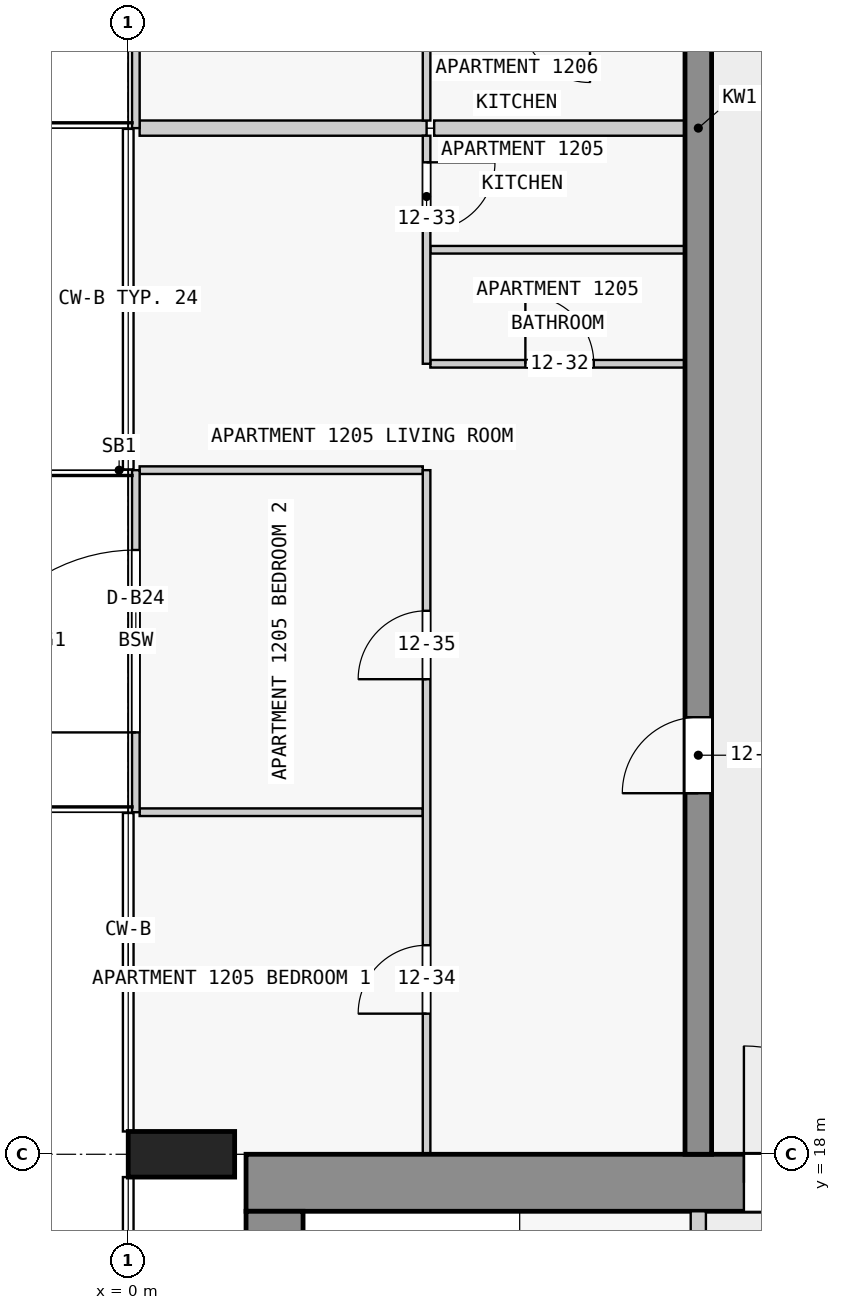
"""IFC4 building model, lengths in metres.
Left out: names, types, materials, properties, quantities, classifications, styles, units other than length and angle.
Written with IfcOpenShell. Run it as: python <this file> out.ifc"""

import sys

from ifc_helpers import new_model, si_unit, direction, frame, frame_2d, origin, origin_2d, place, context, subcontext, project, spatial, rectangle, extrude, element, fill, save


model = new_model("IFC4")
c1 = context("Model", 3, precision=1e-05, world=origin(), true_north=direction((0.0, 1.0)))
c2 = subcontext(c1, "Body", "Model", "MODEL_VIEW")
j1 = project(units=[si_unit("LENGTHUNIT", "METRE"), si_unit("PLANEANGLEUNIT", "RADIAN")], contexts=[c1])
p1 = place(None, origin())
s1 = spatial("IfcSite", under=j1, at=p1, CompositionType="ELEMENT")
p2 = place(p1, origin())
s2 = spatial("IfcBuilding", under=s1, at=p2, CompositionType="ELEMENT")
p3 = place(p2, frame((0.0, 0.0, 51.3)))
s3 = spatial("IfcBuildingStorey", under=s2, at=p3, CompositionType="ELEMENT", Elevation=51.3)
p4 = place(p3, frame((0.7, 18.0, 0.0), z_axis=(0.0, 0.0, 1.0), x_axis=(0.0, 1.0, 0.0)))
e1 = element("IfcColumn", 1, at=p4, inside=s3, PredefinedType="COLUMN", context=c2, shape_type="SweptSolid", body=[
    extrude(rectangle(XDim=0.6, YDim=1.4, at=origin_2d()), origin(), (0.0, 0.0, 1.0), 3.5),
])
p5 = place(p3, frame((1.55, 17.625, 0.0), z_axis=(0.0, 0.0, 1.0), x_axis=(1.0, 0.0, 0.0)))
e2 = element("IfcWall", 2, at=p5, inside=s3, PredefinedType="SHEAR", context=c2, shape_type="SweptSolid", body=[
    extrude(rectangle(XDim=20.95, YDim=0.75, at=frame_2d((10.475, 0.0))), origin(), (0.0, 0.0, 1.0), 3.25),
])
p6 = place(p5, frame((6.55, 0.0, 0.0)))
e3 = element("IfcOpeningElement", 3, at=p6, cuts=e2, PredefinedType="OPENING", context=c2, shape_type="SweptSolid", body=[
    extrude(rectangle(XDim=1.8, YDim=2.1, at=frame_2d((0.9, 1.05))), frame((0.0, 0.385, 0.0), z_axis=(0.0, -1.0, 0.0), x_axis=(1.0, 0.0, 0.0)), (0.0, 0.0, 1.0), 0.77),
])
p7 = place(p3, frame((1.925, 2.5, 0.0), z_axis=(0.0, 0.0, 1.0), x_axis=(0.0, 1.0, 0.0)))
e4 = element("IfcWall", 4, at=p7, inside=s3, PredefinedType="SHEAR", context=c2, shape_type="SweptSolid", body=[
    extrude(rectangle(XDim=14.75, YDim=0.75, at=frame_2d((7.375, 0.0))), origin(), (0.0, 0.0, 1.0), 3.25),
])
p8 = place(p3, frame((7.5, 18.0, 0.0), z_axis=(0.0, 0.0, 1.0), x_axis=(0.0, 1.0, 0.0)))
e5 = element("IfcWall", 5, at=p8, inside=s3, PredefinedType="SHEAR", context=c2, shape_type="SweptSolid", body=[
    extrude(rectangle(XDim=27.0, YDim=0.35, at=frame_2d((13.5, 0.0))), origin(), (0.0, 0.0, 1.0), 3.25),
])
p9 = place(p8, frame((4.75, 0.0, 0.0)))
e6 = element("IfcOpeningElement", 6, at=p9, cuts=e5, PredefinedType="OPENING", context=c2, shape_type="SweptSolid", body=[
    extrude(rectangle(XDim=1.0, YDim=2.1, at=frame_2d((0.5, 1.05))), frame((0.0, 0.185, 0.0), z_axis=(0.0, -1.0, 0.0), x_axis=(1.0, 0.0, 0.0)), (0.0, 0.0, 1.0), 0.37),
])
p10 = place(p8, frame((15.25, 0.0, 0.0)))
e7 = element("IfcOpeningElement", 7, at=p10, cuts=e5, PredefinedType="OPENING", context=c2, shape_type="SweptSolid", body=[
    extrude(rectangle(XDim=1.0, YDim=2.1, at=frame_2d((0.5, 1.05))), frame((0.0, 0.185, 0.0), z_axis=(0.0, -1.0, 0.0), x_axis=(1.0, 0.0, 0.0)), (0.0, 0.0, 1.0), 0.37),
])
p11 = place(p8, frame((19.75, 0.0, 0.0)))
e8 = element("IfcOpeningElement", 8, at=p11, cuts=e5, PredefinedType="OPENING", context=c2, shape_type="SweptSolid", body=[
    extrude(rectangle(XDim=1.0, YDim=2.1, at=frame_2d((0.5, 1.05))), frame((0.0, 0.185, 0.0), z_axis=(0.0, -1.0, 0.0), x_axis=(1.0, 0.0, 0.0)), (0.0, 0.0, 1.0), 0.37),
])
p12 = place(p8, frame((23.25, 0.0, 0.0)))
e9 = element("IfcOpeningElement", 9, at=p12, cuts=e5, PredefinedType="OPENING", context=c2, shape_type="SweptSolid", body=[
    extrude(rectangle(XDim=0.9, YDim=2.1, at=frame_2d((0.45, 1.05))), frame((0.0, 0.185, 0.0), z_axis=(0.0, -1.0, 0.0), x_axis=(1.0, 0.0, 0.0)), (0.0, 0.0, 1.0), 0.37),
])
p13 = place(p8, frame((25.45, 0.0, 0.0)))
e10 = element("IfcOpeningElement", 10, at=p13, cuts=e5, PredefinedType="OPENING", context=c2, shape_type="SweptSolid", body=[
    extrude(rectangle(XDim=1.0, YDim=2.1, at=frame_2d((0.5, 1.05))), frame((0.0, 0.185, 0.0), z_axis=(0.0, -1.0, 0.0), x_axis=(1.0, 0.0, 0.0)), (0.0, 0.0, 1.0), 0.37),
])
p14 = place(p3, frame((0.1, 22.5, 0.0), z_axis=(0.0, 0.0, 1.0), x_axis=(0.0, 1.0, 0.0)))
e11 = element("IfcWall", 11, at=p14, inside=s3, PredefinedType="STANDARD", context=c2, shape_type="SweptSolid", body=[
    extrude(rectangle(XDim=4.5, YDim=0.1, at=frame_2d((2.25, 0.0))), origin(), (0.0, 0.0, 1.0), 3.25),
])
p15 = place(p14, frame((1.05, 0.0, 0.0)))
e12 = element("IfcOpeningElement", 12, at=p15, cuts=e11, PredefinedType="OPENING", context=c2, shape_type="SweptSolid", body=[
    extrude(rectangle(XDim=2.4, YDim=2.4, at=frame_2d((1.2, 1.2))), frame((0.0, 0.06, 0.0), z_axis=(0.0, -1.0, 0.0), x_axis=(1.0, 0.0, 0.0)), (0.0, 0.0, 1.0), 0.12),
])
p16 = place(p3, frame((0.1, 31.5, 0.0), z_axis=(0.0, 0.0, 1.0), x_axis=(0.0, 1.0, 0.0)))
e13 = element("IfcWall", 13, at=p16, inside=s3, PredefinedType="STANDARD", context=c2, shape_type="SweptSolid", body=[
    extrude(rectangle(XDim=4.5, YDim=0.1, at=frame_2d((2.25, 0.0))), origin(), (0.0, 0.0, 1.0), 3.25),
])
p17 = place(p16, frame((1.05, 0.0, 0.0)))
e14 = element("IfcOpeningElement", 14, at=p17, cuts=e13, PredefinedType="OPENING", context=c2, shape_type="SweptSolid", body=[
    extrude(rectangle(XDim=2.4, YDim=2.4, at=frame_2d((1.2, 1.2))), frame((0.0, 0.06, 0.0), z_axis=(0.0, -1.0, 0.0), x_axis=(1.0, 0.0, 0.0)), (0.0, 0.0, 1.0), 0.12),
])
p18 = place(p3, frame((7.5, 10.1, 0.0), z_axis=(0.0, 0.0, 1.0), x_axis=(0.0, 1.0, 0.0)))
e15 = element("IfcWall", 15, at=p18, inside=s3, PredefinedType="PARTITIONING", context=c2, shape_type="SweptSolid", body=[
    extrude(rectangle(XDim=7.15, YDim=0.2, at=frame_2d((3.575, 0.0))), origin(), (0.0, 0.0, 1.0), 3.25),
])
p19 = place(p18, frame((1.5, 0.0, 0.0)))
e16 = element("IfcOpeningElement", 16, at=p19, cuts=e15, PredefinedType="OPENING", context=c2, shape_type="SweptSolid", body=[
    extrude(rectangle(XDim=0.9, YDim=2.1, at=frame_2d((0.45, 1.05))), frame((0.0, 0.11, 0.0), z_axis=(0.0, -1.0, 0.0), x_axis=(1.0, 0.0, 0.0)), (0.0, 0.0, 1.0), 0.22),
])
p20 = place(p18, frame((5.075, 0.0, 0.0)))
e17 = element("IfcOpeningElement", 17, at=p20, cuts=e15, PredefinedType="OPENING", context=c2, shape_type="SweptSolid", body=[
    extrude(rectangle(XDim=0.9, YDim=2.1, at=frame_2d((0.45, 1.05))), frame((0.0, 0.11, 0.0), z_axis=(0.0, -1.0, 0.0), x_axis=(1.0, 0.0, 0.0)), (0.0, 0.0, 1.0), 0.22),
])
for number, where, z_axis, x_axis in (
    (18, (3.875, 22.5, 0.0), (0.0, 0.0, 1.0), (-1.0, 0.0, 0.0)),
    (19, (3.875, 27.0, 0.0), (0.0, 0.0, 1.0), (-1.0, 0.0, 0.0)),
):
    element("IfcWall", number, at=place(p3, frame(where, z_axis=z_axis, x_axis=x_axis)), inside=s3, PredefinedType="PARTITIONING", context=c2, shape_type="SweptSolid", body=[
        extrude(rectangle(XDim=3.725, YDim=0.1, at=frame_2d((1.863, 0.0))), origin(), (0.0, 0.0, 1.0), 3.25),
    ])
p21 = place(p3, frame((3.975, 28.4, 0.0), z_axis=(0.0, 0.0, 1.0), x_axis=(1.0, 0.0, 0.0)))
e20 = element("IfcWall", 20, at=p21, inside=s3, PredefinedType="PARTITIONING", context=c2, shape_type="SweptSolid", body=[
    extrude(rectangle(XDim=3.35, YDim=0.1, at=frame_2d((1.675, 0.0))), origin(), (0.0, 0.0, 1.0), 3.25),
])
p22 = place(p21, frame((1.25, 0.0, 0.0)))
e21 = element("IfcOpeningElement", 21, at=p22, cuts=e20, PredefinedType="OPENING", context=c2, shape_type="SweptSolid", body=[
    extrude(rectangle(XDim=0.9, YDim=2.1, at=frame_2d((0.45, 1.05))), frame((0.0, 0.06, 0.0), z_axis=(0.0, -1.0, 0.0), x_axis=(1.0, 0.0, 0.0)), (0.0, 0.0, 1.0), 0.12),
])
p23 = place(p3, frame((7.325, 29.9, 0.0), z_axis=(0.0, 0.0, 1.0), x_axis=(-1.0, 0.0, 0.0)))
e22 = element("IfcWall", 22, at=p23, inside=s3, PredefinedType="PARTITIONING", context=c2, shape_type="SweptSolid", body=[
    extrude(rectangle(XDim=3.35, YDim=0.1, at=frame_2d((1.675, 0.0))), origin(), (0.0, 0.0, 1.0), 3.25),
])
p24 = place(p3, frame((7.325, 31.5, 0.0), z_axis=(0.0, 0.0, 1.0), x_axis=(-1.0, 0.0, 0.0)))
e23 = element("IfcWall", 23, at=p24, inside=s3, PredefinedType="PARTITIONING", context=c2, shape_type="SweptSolid", body=[
    extrude(rectangle(XDim=3.3, YDim=0.2, at=frame_2d((1.65, 0.0))), origin(), (0.0, 0.0, 1.0), 3.25),
])
p25 = place(p3, frame((0.15, 31.5, 0.0), z_axis=(0.0, 0.0, 1.0), x_axis=(1.0, 0.0, 0.0)))
e24 = element("IfcWall", 24, at=p25, inside=s3, PredefinedType="PARTITIONING", context=c2, shape_type="SweptSolid", body=[
    extrude(rectangle(XDim=3.775, YDim=0.2, at=frame_2d((1.888, 0.0))), origin(), (0.0, 0.0, 1.0), 3.25),
])
p26 = place(p3, frame((3.925, 31.4, 0.0), z_axis=(0.0, 0.0, 1.0), x_axis=(0.0, -1.0, 0.0)))
e25 = element("IfcWall", 25, at=p26, inside=s3, PredefinedType="PARTITIONING", context=c2, shape_type="SweptSolid", body=[
    extrude(rectangle(XDim=3.0, YDim=0.1, at=frame_2d((1.5, 0.0))), origin(), (0.0, 0.0, 1.0), 3.25),
])
p27 = place(p26, frame((0.35, 0.0, 0.0)))
e26 = element("IfcOpeningElement", 26, at=p27, cuts=e25, PredefinedType="OPENING", context=c2, shape_type="SweptSolid", body=[
    extrude(rectangle(XDim=0.9, YDim=2.1, at=frame_2d((0.45, 1.05))), frame((0.0, 0.06, 0.0), z_axis=(0.0, -1.0, 0.0), x_axis=(1.0, 0.0, 0.0)), (0.0, 0.0, 1.0), 0.12),
])
p28 = place(p3, frame((3.925, 33.0, 0.0), z_axis=(0.0, 0.0, 1.0), x_axis=(0.0, -1.0, 0.0)))
e27 = element("IfcWall", 27, at=p28, inside=s3, PredefinedType="PARTITIONING", context=c2, shape_type="SweptSolid", body=[
    extrude(rectangle(XDim=1.4, YDim=0.1, at=frame_2d((0.7, 0.0))), origin(), (0.0, 0.0, 1.0), 3.25),
])
p29 = place(p3, frame((3.925, 18.0, 0.0), z_axis=(0.0, 0.0, 1.0), x_axis=(0.0, 1.0, 0.0)))
e28 = element("IfcWall", 28, at=p29, inside=s3, PredefinedType="PARTITIONING", context=c2, shape_type="SweptSolid", body=[
    extrude(rectangle(XDim=9.0, YDim=0.1, at=frame_2d((4.5, 0.0))), origin(), (0.0, 0.0, 1.0), 3.25),
])
p30 = place(p29, frame((1.85, 0.0, 0.0)))
e29 = element("IfcOpeningElement", 29, at=p30, cuts=e28, PredefinedType="OPENING", context=c2, shape_type="SweptSolid", body=[
    extrude(rectangle(XDim=0.9, YDim=2.1, at=frame_2d((0.45, 1.05))), frame((0.0, 0.06, 0.0), z_axis=(0.0, -1.0, 0.0), x_axis=(1.0, 0.0, 0.0)), (0.0, 0.0, 1.0), 0.12),
])
p31 = place(p29, frame((6.25, 0.0, 0.0)))
e30 = element("IfcOpeningElement", 30, at=p31, cuts=e28, PredefinedType="OPENING", context=c2, shape_type="SweptSolid", body=[
    extrude(rectangle(XDim=0.9, YDim=2.1, at=frame_2d((0.45, 1.05))), frame((0.0, 0.06, 0.0), z_axis=(0.0, -1.0, 0.0), x_axis=(1.0, 0.0, 0.0)), (0.0, 0.0, 1.0), 0.12),
])
p32 = place(p15, origin())
e31 = element("IfcDoor", 31, at=p32, inside=s3, OperationType="SINGLE_SWING_LEFT", PredefinedType="DOOR", context=c2, shape_type="SweptSolid", body=[
    extrude(rectangle(XDim=2.4, YDim=2.4, at=frame_2d((1.2, 1.2))), frame((0.0, 0.025, 0.0), z_axis=(0.0, -1.0, 0.0), x_axis=(1.0, 0.0, 0.0)), (0.0, 0.0, 1.0), 0.05),
])
fill(e12, e31)
p33 = place(p6, origin())
e32 = element("IfcDoor", 32, at=p33, inside=s3, OperationType="DOUBLE_DOOR_SINGLE_SWING", PredefinedType="DOOR", context=c2, shape_type="SweptSolid", body=[
    extrude(rectangle(XDim=1.8, YDim=2.1, at=frame_2d((0.9, 1.05))), frame((0.0, 0.025, 0.0), z_axis=(0.0, -1.0, 0.0), x_axis=(1.0, 0.0, 0.0)), (0.0, 0.0, 1.0), 0.05),
])
fill(e3, e32)
p34 = place(p9, origin())
e33 = element("IfcDoor", 33, at=p34, inside=s3, OperationType="SINGLE_SWING_LEFT", PredefinedType="DOOR", context=c2, shape_type="SweptSolid", body=[
    extrude(rectangle(XDim=1.0, YDim=2.1, at=frame_2d((0.5, 1.05))), frame((0.0, 0.025, 0.0), z_axis=(0.0, -1.0, 0.0), x_axis=(1.0, 0.0, 0.0)), (0.0, 0.0, 1.0), 0.05),
])
fill(e6, e33)
p35 = place(p22, origin())
e34 = element("IfcDoor", 34, at=p35, inside=s3, OperationType="SINGLE_SWING_RIGHT", PredefinedType="DOOR", context=c2, shape_type="SweptSolid", body=[
    extrude(rectangle(XDim=0.9, YDim=2.1, at=frame_2d((0.45, 1.05))), frame((0.0, 0.025, 0.0), z_axis=(0.0, -1.0, 0.0), x_axis=(1.0, 0.0, 0.0)), (0.0, 0.0, 1.0), 0.05),
])
fill(e21, e34)
p36 = place(p27, origin())
e35 = element("IfcDoor", 35, at=p36, inside=s3, OperationType="SINGLE_SWING_LEFT", PredefinedType="DOOR", context=c2, shape_type="SweptSolid", body=[
    extrude(rectangle(XDim=0.9, YDim=2.1, at=frame_2d((0.45, 1.05))), frame((0.0, 0.025, 0.0), z_axis=(0.0, -1.0, 0.0), x_axis=(1.0, 0.0, 0.0)), (0.0, 0.0, 1.0), 0.05),
])
fill(e26, e35)
p37 = place(p30, origin())
e36 = element("IfcDoor", 36, at=p37, inside=s3, OperationType="SINGLE_SWING_LEFT", PredefinedType="DOOR", context=c2, shape_type="SweptSolid", body=[
    extrude(rectangle(XDim=0.9, YDim=2.1, at=frame_2d((0.45, 1.05))), frame((0.0, 0.025, 0.0), z_axis=(0.0, -1.0, 0.0), x_axis=(1.0, 0.0, 0.0)), (0.0, 0.0, 1.0), 0.05),
])
fill(e29, e36)
p38 = place(p31, origin())
e37 = element("IfcDoor", 37, at=p38, inside=s3, OperationType="SINGLE_SWING_RIGHT", PredefinedType="DOOR", context=c2, shape_type="SweptSolid", body=[
    extrude(rectangle(XDim=0.9, YDim=2.1, at=frame_2d((0.45, 1.05))), frame((0.0, 0.025, 0.0), z_axis=(0.0, -1.0, 0.0), x_axis=(1.0, 0.0, 0.0)), (0.0, 0.0, 1.0), 0.05),
])
fill(e30, e37)
save(model, sys.argv[1])
